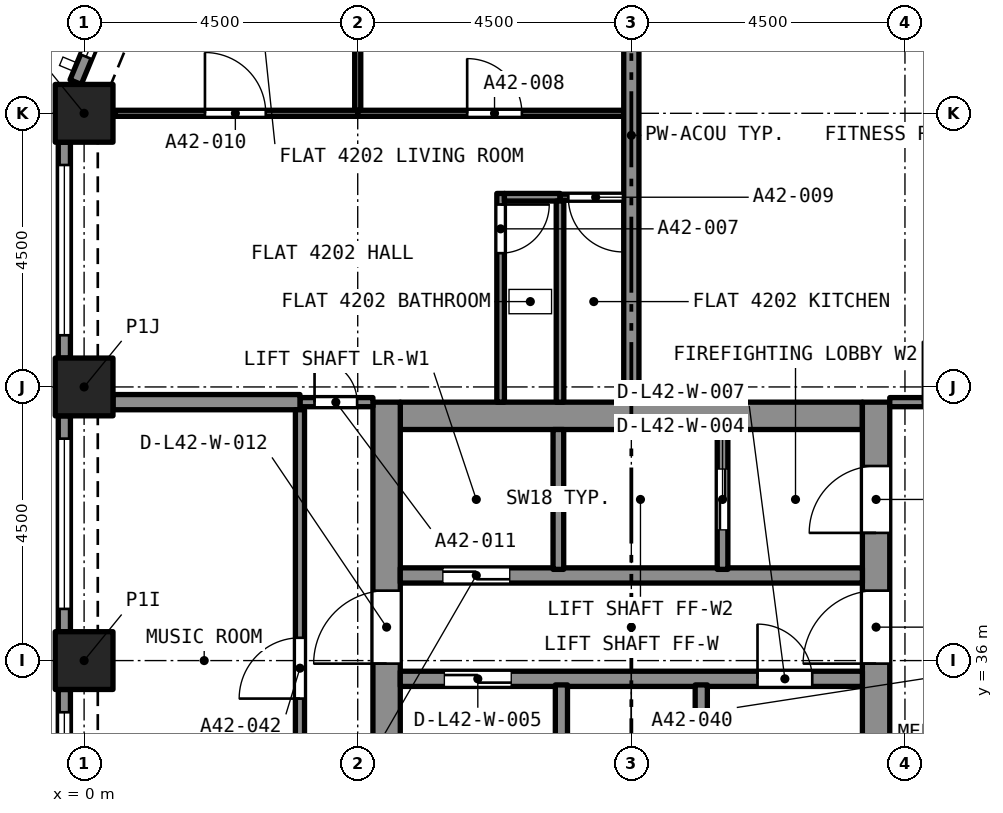
"""IFC4 building model, lengths in metres.
Left out: names, types, materials, properties, quantities, classifications, styles, units other than length and angle.
Written with IfcOpenShell. Run it as: python <this file> out.ifc"""

import sys

from ifc_helpers import new_model, si_unit, direction, frame, frame_2d, origin, origin_2d, place, context, subcontext, project, spatial, rectangle, extrude, element, fill, save


model = new_model("IFC4")
c1 = context("Model", 3, precision=1e-05, world=origin(), true_north=direction((0.0, 1.0)))
c2 = subcontext(c1, "Body", "Model", "MODEL_VIEW")
j1 = project(units=[si_unit("LENGTHUNIT", "METRE"), si_unit("PLANEANGLEUNIT", "RADIAN")], contexts=[c1])
p1 = place(None, origin())
s1 = spatial("IfcSite", under=j1, at=p1, CompositionType="ELEMENT")
p2 = place(p1, origin())
s2 = spatial("IfcBuilding", under=s1, at=p2, CompositionType="ELEMENT")
p3 = place(p2, frame((0.0, 0.0, 150.6)))
s3 = spatial("IfcBuildingStorey", under=s2, at=p3, CompositionType="ELEMENT", Elevation=150.6)
for number, where, z_axis, x_axis in (
    (1, (0.0, 36.0, 0.0), (0.0, 0.0, 1.0), (1.0, 0.0, 0.0)),
    (2, (0.0, 40.5, 0.0), (0.0, 0.0, 1.0), (1.0, 0.0, 0.0)),
    (3, (0.0, 45.0, 0.0), (0.0, 0.0, 1.0), (1.0, 0.0, 0.0)),
):
    element("IfcColumn", number, at=place(p3, frame(where, z_axis=z_axis, x_axis=x_axis)), inside=s3, PredefinedType="COLUMN", context=c2, shape_type="SweptSolid", body=[
        extrude(rectangle(XDim=0.95, YDim=0.95, at=origin_2d()), origin(), (0.0, 0.0, 1.0), 4.4),
    ])
p4 = place(p3, frame((5.2, 40.025, 0.0), z_axis=(0.0, 0.0, 1.0), x_axis=(1.0, 0.0, 0.0)))
e4 = element("IfcWall", 4, at=p4, inside=s3, PredefinedType="SOLIDWALL", context=c2, shape_type="SweptSolid", body=[
    extrude(rectangle(XDim=7.6, YDim=0.45, at=frame_2d((3.8, 0.0))), origin(), (0.0, 0.0, 1.0), 4.4),
])
p5 = place(p3, frame((4.975, 27.25, 0.0), z_axis=(0.0, 0.0, 1.0), x_axis=(0.0, 1.0, 0.0)))
e5 = element("IfcWall", 5, at=p5, inside=s3, PredefinedType="SOLIDWALL", context=c2, shape_type="SweptSolid", body=[
    extrude(rectangle(XDim=13.0, YDim=0.45, at=frame_2d((6.5, 0.0))), origin(), (0.0, 0.0, 1.0), 4.4),
])
p6 = place(p5, frame((8.7, 0.0, 0.0)))
e6 = element("IfcOpeningElement", 6, at=p6, cuts=e5, PredefinedType="OPENING", context=c2, shape_type="SweptSolid", body=[
    extrude(rectangle(XDim=1.2, YDim=2.1, at=frame_2d((0.6, 1.05))), frame((0.0, 0.235, 0.0), z_axis=(0.0, -1.0, 0.0), x_axis=(1.0, 0.0, 0.0)), (0.0, 0.0, 1.0), 0.47),
])
p7 = place(p3, frame((13.025, 27.25, 0.0), z_axis=(0.0, 0.0, 1.0), x_axis=(0.0, 1.0, 0.0)))
e7 = element("IfcWall", 7, at=p7, inside=s3, PredefinedType="SOLIDWALL", context=c2, shape_type="SweptSolid", body=[
    extrude(rectangle(XDim=13.0, YDim=0.45, at=frame_2d((6.5, 0.0))), origin(), (0.0, 0.0, 1.0), 4.4),
])
p8 = place(p7, frame((10.85, 0.0, 0.0)))
e8 = element("IfcOpeningElement", 8, at=p8, cuts=e7, PredefinedType="OPENING", context=c2, shape_type="SweptSolid", body=[
    extrude(rectangle(XDim=1.1, YDim=2.1, at=frame_2d((0.55, 1.05))), frame((0.0, 0.235, 0.0), z_axis=(0.0, -1.0, 0.0), x_axis=(1.0, 0.0, 0.0)), (0.0, 0.0, 1.0), 0.47),
])
p9 = place(p7, frame((8.7, 0.0, 0.0)))
e9 = element("IfcOpeningElement", 9, at=p9, cuts=e7, PredefinedType="OPENING", context=c2, shape_type="SweptSolid", body=[
    extrude(rectangle(XDim=1.2, YDim=2.1, at=frame_2d((0.6, 1.05))), frame((0.0, 0.235, 0.0), z_axis=(0.0, -1.0, 0.0), x_axis=(1.0, 0.0, 0.0)), (0.0, 0.0, 1.0), 0.47),
])
p10 = place(p3, frame((-0.139, 45.513, 0.0), z_axis=(0.0, 0.0, 1.0), x_axis=(0.382680855588, 0.923880599843, 0.0)))
e10 = element("IfcWall", 10, at=p10, inside=s3, PredefinedType="SOLIDWALL", context=c2, shape_type="SweptSolid", body=[
    extrude(rectangle(XDim=2.403, YDim=0.2, at=frame_2d((1.201, 0.0))), origin(), (0.0, 0.0, 1.0), 4.4),
])
p11 = place(p10, frame((0.451, 0.0, 0.45)))
e11 = element("IfcOpeningElement", 11, at=p11, cuts=e10, PredefinedType="OPENING", context=c2, shape_type="SweptSolid", body=[
    extrude(rectangle(XDim=1.7, YDim=2.55, at=frame_2d((0.85, 1.275))), frame((0.0, 0.11, 0.0), z_axis=(0.0, -1.0, 0.0), x_axis=(1.0, 0.0, 0.0)), (0.0, 0.0, 1.0), 0.22),
])
p12 = place(p3, frame((-0.325, 40.975, 0.0), z_axis=(0.0, 0.0, 1.0), x_axis=(0.0, 1.0, 0.0)))
e12 = element("IfcWall", 12, at=p12, inside=s3, PredefinedType="SOLIDWALL", context=c2, shape_type="SweptSolid", body=[
    extrude(rectangle(XDim=3.55, YDim=0.2, at=frame_2d((1.775, 0.0))), origin(), (0.0, 0.0, 1.0), 4.4),
])
p13 = place(p12, frame((0.375, 0.0, 0.45)))
e13 = element("IfcOpeningElement", 13, at=p13, cuts=e12, PredefinedType="OPENING", context=c2, shape_type="SweptSolid", body=[
    extrude(rectangle(XDim=2.8, YDim=2.55, at=frame_2d((1.4, 1.275))), frame((0.0, 0.11, 0.0), z_axis=(0.0, -1.0, 0.0), x_axis=(1.0, 0.0, 0.0)), (0.0, 0.0, 1.0), 0.22),
])
p14 = place(p3, frame((-0.325, 36.475, 0.0), z_axis=(0.0, 0.0, 1.0), x_axis=(0.0, 1.0, 0.0)))
e14 = element("IfcWall", 14, at=p14, inside=s3, PredefinedType="SOLIDWALL", context=c2, shape_type="SweptSolid", body=[
    extrude(rectangle(XDim=3.55, YDim=0.2, at=frame_2d((1.775, 0.0))), origin(), (0.0, 0.0, 1.0), 4.4),
])
p15 = place(p14, frame((0.375, 0.0, 0.45)))
e15 = element("IfcOpeningElement", 15, at=p15, cuts=e14, PredefinedType="OPENING", context=c2, shape_type="SweptSolid", body=[
    extrude(rectangle(XDim=2.8, YDim=2.55, at=frame_2d((1.4, 1.275))), frame((0.0, 0.11, 0.0), z_axis=(0.0, -1.0, 0.0), x_axis=(1.0, 0.0, 0.0)), (0.0, 0.0, 1.0), 0.22),
])
p16 = place(p3, frame((-0.325, 31.975, 0.0), z_axis=(0.0, 0.0, 1.0), x_axis=(0.0, 1.0, 0.0)))
e16 = element("IfcWall", 16, at=p16, inside=s3, PredefinedType="SOLIDWALL", context=c2, shape_type="SweptSolid", body=[
    extrude(rectangle(XDim=3.55, YDim=0.2, at=frame_2d((1.775, 0.0))), origin(), (0.0, 0.0, 1.0), 4.4),
])
p17 = place(p16, frame((0.375, 0.0, 0.45)))
e17 = element("IfcOpeningElement", 17, at=p17, cuts=e16, PredefinedType="OPENING", context=c2, shape_type="SweptSolid", body=[
    extrude(rectangle(XDim=2.8, YDim=2.55, at=frame_2d((1.4, 1.275))), frame((0.0, 0.11, 0.0), z_axis=(0.0, -1.0, 0.0), x_axis=(1.0, 0.0, 0.0)), (0.0, 0.0, 1.0), 0.22),
])
p18 = place(p3, frame((6.85, 43.683, 0.0), z_axis=(0.0, 0.0, 1.0), x_axis=(0.0, -1.0, 0.0)))
e18 = element("IfcWall", 18, at=p18, inside=s3, PredefinedType="PARTITIONING", context=c2, shape_type="SweptSolid", body=[
    extrude(rectangle(XDim=3.433, YDim=0.125, at=frame_2d((1.716, 0.0))), origin(), (0.0, 0.0, 1.0), 4.1),
])
p19 = place(p18, frame((0.183, 0.0, 0.0)))
e19 = element("IfcOpeningElement", 19, at=p19, cuts=e18, PredefinedType="OPENING", context=c2, shape_type="SweptSolid", body=[
    extrude(rectangle(XDim=0.8, YDim=2.1, at=frame_2d((0.4, 1.05))), frame((0.0, 0.073, 0.0), z_axis=(0.0, -1.0, 0.0), x_axis=(1.0, 0.0, 0.0)), (0.0, 0.0, 1.0), 0.145),
])
p20 = place(p3, frame((6.913, 43.62, 0.0), z_axis=(0.0, 0.0, 1.0), x_axis=(1.0, 0.0, 0.0)))
e20 = element("IfcWall", 20, at=p20, inside=s3, PredefinedType="PARTITIONING", context=c2, shape_type="SweptSolid", body=[
    extrude(rectangle(XDim=0.915, YDim=0.125, at=frame_2d((0.458, 0.0))), origin(), (0.0, 0.0, 1.0), 4.1),
])
p21 = place(p3, frame((7.827, 40.25, 0.0), z_axis=(0.0, 0.0, 1.0), x_axis=(0.0, 1.0, 0.0)))
e21 = element("IfcWall", 21, at=p21, inside=s3, PredefinedType="PARTITIONING", context=c2, shape_type="SweptSolid", body=[
    extrude(rectangle(XDim=3.308, YDim=0.125, at=frame_2d((1.654, 0.0))), origin(), (0.0, 0.0, 1.0), 4.1),
])
p22 = place(p3, frame((4.5, 45.0, 0.0), z_axis=(0.0, 0.0, 1.0), x_axis=(1.0, 0.0, 0.0)))
e22 = element("IfcWall", 22, at=p22, inside=s3, PredefinedType="PARTITIONING", context=c2, shape_type="SweptSolid", body=[
    extrude(rectangle(XDim=4.375, YDim=0.1, at=frame_2d((2.188, 0.0))), origin(), (0.0, 0.0, 1.0), 4.1),
])
p23 = place(p22, frame((1.8, 0.0, 0.0)))
e23 = element("IfcOpeningElement", 23, at=p23, cuts=e22, PredefinedType="OPENING", context=c2, shape_type="SweptSolid", body=[
    extrude(rectangle(XDim=0.9, YDim=2.1, at=frame_2d((0.45, 1.05))), frame((0.0, 0.06, 0.0), z_axis=(0.0, -1.0, 0.0), x_axis=(1.0, 0.0, 0.0)), (0.0, 0.0, 1.0), 0.12),
])
p24 = place(p3, frame((4.5, 45.05, 0.0), z_axis=(0.0, 0.0, 1.0), x_axis=(0.0, 1.0, 0.0)))
e24 = element("IfcWall", 24, at=p24, inside=s3, PredefinedType="PARTITIONING", context=c2, shape_type="SweptSolid", body=[
    extrude(rectangle(XDim=3.936, YDim=0.1, at=frame_2d((1.968, 0.0))), origin(), (0.0, 0.0, 1.0), 4.1),
])
p25 = place(p3, frame((8.875, 43.62, 0.0), z_axis=(0.0, 0.0, 1.0), x_axis=(-1.0, 0.0, 0.0)))
e25 = element("IfcWall", 25, at=p25, inside=s3, PredefinedType="PARTITIONING", context=c2, shape_type="SweptSolid", body=[
    extrude(rectangle(XDim=1.048, YDim=0.1, at=frame_2d((0.524, 0.0))), origin(), (0.0, 0.0, 1.0), 4.1),
])
p26 = place(p25, frame((0.011, 0.0, 0.0)))
e26 = element("IfcOpeningElement", 26, at=p26, cuts=e25, PredefinedType="OPENING", context=c2, shape_type="SweptSolid", body=[
    extrude(rectangle(XDim=0.9, YDim=2.1, at=frame_2d((0.45, 1.05))), frame((0.0, 0.06, 0.0), z_axis=(0.0, -1.0, 0.0), x_axis=(1.0, 0.0, 0.0)), (0.0, 0.0, 1.0), 0.12),
])
p27 = place(p3, frame((0.514, 45.0, 0.0), z_axis=(0.0, 0.0, 1.0), x_axis=(1.0, 0.0, 0.0)))
e27 = element("IfcWall", 27, at=p27, inside=s3, PredefinedType="PARTITIONING", context=c2, shape_type="SweptSolid", body=[
    extrude(rectangle(XDim=3.986, YDim=0.1, at=frame_2d((1.993, 0.0))), origin(), (0.0, 0.0, 1.0), 4.1),
])
p28 = place(p27, frame((1.473, 0.0, 0.0)))
e28 = element("IfcOpeningElement", 28, at=p28, cuts=e27, PredefinedType="OPENING", context=c2, shape_type="SweptSolid", body=[
    extrude(rectangle(XDim=1.0, YDim=2.1, at=frame_2d((0.5, 1.05))), frame((0.0, 0.06, 0.0), z_axis=(0.0, -1.0, 0.0), x_axis=(1.0, 0.0, 0.0)), (0.0, 0.0, 1.0), 0.12),
])
p29 = place(p3, frame((3.55, 40.25, 0.0), z_axis=(0.0, 0.0, 1.0), x_axis=(1.0, 0.0, 0.0)))
e29 = element("IfcWall", 29, at=p29, inside=s3, PredefinedType="PARTITIONING", context=c2, shape_type="SweptSolid", body=[
    extrude(rectangle(XDim=1.2, YDim=0.15, at=frame_2d((0.6, 0.0))), origin(), (0.0, 0.0, 1.0), 4.1),
])
p30 = place(p29, frame((0.24, 0.0, 0.0)))
e30 = element("IfcOpeningElement", 30, at=p30, cuts=e29, PredefinedType="OPENING", context=c2, shape_type="SweptSolid", body=[
    extrude(rectangle(XDim=0.7, YDim=2.1, at=frame_2d((0.35, 1.05))), frame((0.0, 0.085, 0.0), z_axis=(0.0, -1.0, 0.0), x_axis=(1.0, 0.0, 0.0)), (0.0, 0.0, 1.0), 0.17),
])
p31 = place(p3, frame((0.475, 40.25, 0.0), z_axis=(0.0, 0.0, 1.0), x_axis=(1.0, 0.0, 0.0)))
e31 = element("IfcWall", 31, at=p31, inside=s3, PredefinedType="PARTITIONING", context=c2, shape_type="SweptSolid", body=[
    extrude(rectangle(XDim=3.075, YDim=0.25, at=frame_2d((1.538, 0.0))), origin(), (0.0, 0.0, 1.0), 4.1),
])
p32 = place(p3, frame((9.0, 40.25, 0.0), z_axis=(0.0, 0.0, 1.0), x_axis=(0.0, 1.0, 0.0)))
e32 = element("IfcWall", 32, at=p32, inside=s3, PredefinedType="PARTITIONING", context=c2, shape_type="SweptSolid", body=[
    extrude(rectangle(XDim=8.775, YDim=0.25, at=frame_2d((4.387, 0.0))), origin(), (0.0, 0.0, 1.0), 4.1),
])
p33 = place(p3, frame((13.25, 40.25, 0.0), z_axis=(0.0, 0.0, 1.0), x_axis=(1.0, 0.0, 0.0)))
e33 = element("IfcWall", 33, at=p33, inside=s3, PredefinedType="PARTITIONING", context=c2, shape_type="SweptSolid", body=[
    extrude(rectangle(XDim=1.675, YDim=0.15, at=frame_2d((0.837, 0.0))), origin(), (0.0, 0.0, 1.0), 4.1),
])
p34 = place(p33, frame((0.545, 0.0, 0.0)))
e34 = element("IfcOpeningElement", 34, at=p34, cuts=e33, PredefinedType="OPENING", context=c2, shape_type="SweptSolid", body=[
    extrude(rectangle(XDim=1.0, YDim=2.1, at=frame_2d((0.5, 1.05))), frame((0.0, 0.085, 0.0), z_axis=(0.0, -1.0, 0.0), x_axis=(1.0, 0.0, 0.0)), (0.0, 0.0, 1.0), 0.17),
])
p35 = place(p3, frame((3.55, 31.5, 0.0), z_axis=(0.0, 0.0, 1.0), x_axis=(0.0, 1.0, 0.0)))
e35 = element("IfcWall", 35, at=p35, inside=s3, PredefinedType="PARTITIONING", context=c2, shape_type="SweptSolid", body=[
    extrude(rectangle(XDim=8.625, YDim=0.15, at=frame_2d((4.312, 0.0))), origin(), (0.0, 0.0, 1.0), 4.1),
])
p36 = place(p35, frame((3.875, 0.0, 0.0)))
e36 = element("IfcOpeningElement", 36, at=p36, cuts=e35, PredefinedType="OPENING", context=c2, shape_type="SweptSolid", body=[
    extrude(rectangle(XDim=1.0, YDim=2.1, at=frame_2d((0.5, 1.05))), frame((0.0, 0.085, 0.0), z_axis=(0.0, -1.0, 0.0), x_axis=(1.0, 0.0, 0.0)), (0.0, 0.0, 1.0), 0.17),
])
p37 = place(p3, frame((5.2, 35.7, 0.0), z_axis=(0.0, 0.0, 1.0), x_axis=(1.0, 0.0, 0.0)))
e37 = element("IfcWall", 37, at=p37, inside=s3, PredefinedType="SOLIDWALL", context=c2, shape_type="SweptSolid", body=[
    extrude(rectangle(XDim=7.6, YDim=0.25, at=frame_2d((3.8, 0.0))), origin(), (0.0, 0.0, 1.0), 4.1),
])
p38 = place(p37, frame((0.725, 0.0, 0.0)))
e38 = element("IfcOpeningElement", 38, at=p38, cuts=e37, PredefinedType="OPENING", context=c2, shape_type="SweptSolid", body=[
    extrude(rectangle(XDim=1.1, YDim=2.4, at=frame_2d((0.55, 1.2))), frame((0.0, 0.135, 0.0), z_axis=(0.0, -1.0, 0.0), x_axis=(1.0, 0.0, 0.0)), (0.0, 0.0, 1.0), 0.27),
])
p39 = place(p37, frame((5.875, 0.0, 0.0)))
e39 = element("IfcOpeningElement", 39, at=p39, cuts=e37, PredefinedType="OPENING", context=c2, shape_type="SweptSolid", body=[
    extrude(rectangle(XDim=0.9, YDim=2.1, at=frame_2d((0.45, 1.05))), frame((0.0, 0.135, 0.0), z_axis=(0.0, -1.0, 0.0), x_axis=(1.0, 0.0, 0.0)), (0.0, 0.0, 1.0), 0.27),
])
p40 = place(p3, frame((5.2, 37.4, 0.0), z_axis=(0.0, 0.0, 1.0), x_axis=(1.0, 0.0, 0.0)))
e40 = element("IfcWall", 40, at=p40, inside=s3, PredefinedType="SOLIDWALL", context=c2, shape_type="SweptSolid", body=[
    extrude(rectangle(XDim=7.6, YDim=0.25, at=frame_2d((3.8, 0.0))), origin(), (0.0, 0.0, 1.0), 4.1),
])
p41 = place(p40, frame((0.7, 0.0, 0.0)))
e41 = element("IfcOpeningElement", 41, at=p41, cuts=e40, PredefinedType="OPENING", context=c2, shape_type="SweptSolid", body=[
    extrude(rectangle(XDim=1.1, YDim=2.4, at=frame_2d((0.55, 1.2))), frame((0.0, 0.135, 0.0), z_axis=(0.0, -1.0, 0.0), x_axis=(1.0, 0.0, 0.0)), (0.0, 0.0, 1.0), 0.27),
])
for number, where, z_axis, x_axis in (
    (42, (7.85, 33.3, 0.0), (0.0, 0.0, 1.0), (0.0, 1.0, 0.0)),
    (43, (10.15, 33.3, 0.0), (0.0, 0.0, 1.0), (0.0, 1.0, 0.0)),
):
    element("IfcWall", number, at=place(p3, frame(where, z_axis=z_axis, x_axis=x_axis)), inside=s3, PredefinedType="SOLIDWALL", context=c2, shape_type="SweptSolid", body=[
        extrude(rectangle(XDim=2.3, YDim=0.2, at=frame_2d((1.15, 0.0))), origin(), (0.0, 0.0, 1.0), 4.1),
    ])
p42 = place(p3, frame((7.8, 37.5, 0.0), z_axis=(0.0, 0.0, 1.0), x_axis=(0.0, 1.0, 0.0)))
e44 = element("IfcWall", 44, at=p42, inside=s3, PredefinedType="SOLIDWALL", context=c2, shape_type="SweptSolid", body=[
    extrude(rectangle(XDim=2.3, YDim=0.175, at=frame_2d((1.15, 0.0))), origin(), (0.0, 0.0, 1.0), 4.1),
])
p43 = place(p3, frame((10.5, 37.5, 0.0), z_axis=(0.0, 0.0, 1.0), x_axis=(0.0, 1.0, 0.0)))
e45 = element("IfcWall", 45, at=p43, inside=s3, PredefinedType="SOLIDWALL", context=c2, shape_type="SweptSolid", body=[
    extrude(rectangle(XDim=2.3, YDim=0.175, at=frame_2d((1.15, 0.0))), origin(), (0.0, 0.0, 1.0), 4.1),
])
p44 = place(p43, frame((0.65, 0.0, 0.0)))
e46 = element("IfcOpeningElement", 46, at=p44, cuts=e45, PredefinedType="OPENING", context=c2, shape_type="SweptSolid", body=[
    extrude(rectangle(XDim=1.0, YDim=2.1, at=frame_2d((0.5, 1.05))), frame((0.0, 0.097, 0.0), z_axis=(0.0, -1.0, 0.0), x_axis=(1.0, 0.0, 0.0)), (0.0, 0.0, 1.0), 0.195),
])
p45 = place(p11, origin())
e47 = element("IfcWindow", 47, at=p45, inside=s3, PartitioningType="SINGLE_PANEL", PredefinedType="WINDOW", context=c2, shape_type="SweptSolid", body=[
    extrude(rectangle(XDim=1.7, YDim=2.55, at=frame_2d((0.85, 1.275))), frame((0.0, 0.03, 0.0), z_axis=(0.0, -1.0, 0.0), x_axis=(1.0, 0.0, 0.0)), (0.0, 0.0, 1.0), 0.06),
])
fill(e11, e47)
p46 = place(p13, origin())
e48 = element("IfcWindow", 48, at=p46, inside=s3, PartitioningType="SINGLE_PANEL", PredefinedType="WINDOW", context=c2, shape_type="SweptSolid", body=[
    extrude(rectangle(XDim=2.8, YDim=2.55, at=frame_2d((1.4, 1.275))), frame((0.0, 0.03, 0.0), z_axis=(0.0, -1.0, 0.0), x_axis=(1.0, 0.0, 0.0)), (0.0, 0.0, 1.0), 0.06),
])
fill(e13, e48)
p47 = place(p15, origin())
e49 = element("IfcWindow", 49, at=p47, inside=s3, PartitioningType="SINGLE_PANEL", PredefinedType="WINDOW", context=c2, shape_type="SweptSolid", body=[
    extrude(rectangle(XDim=2.8, YDim=2.55, at=frame_2d((1.4, 1.275))), frame((0.0, 0.03, 0.0), z_axis=(0.0, -1.0, 0.0), x_axis=(1.0, 0.0, 0.0)), (0.0, 0.0, 1.0), 0.06),
])
fill(e15, e49)
p48 = place(p17, origin())
e50 = element("IfcWindow", 50, at=p48, inside=s3, PartitioningType="SINGLE_PANEL", PredefinedType="WINDOW", context=c2, shape_type="SweptSolid", body=[
    extrude(rectangle(XDim=2.8, YDim=2.55, at=frame_2d((1.4, 1.275))), frame((0.0, 0.03, 0.0), z_axis=(0.0, -1.0, 0.0), x_axis=(1.0, 0.0, 0.0)), (0.0, 0.0, 1.0), 0.06),
])
fill(e17, e50)
p49 = place(p19, origin())
e51 = element("IfcDoor", 51, at=p49, inside=s3, OperationType="SINGLE_SWING_LEFT", PredefinedType="DOOR", context=c2, shape_type="SweptSolid", body=[
    extrude(rectangle(XDim=0.8, YDim=2.1, at=frame_2d((0.4, 1.05))), frame((0.0, 0.025, 0.0), z_axis=(0.0, -1.0, 0.0), x_axis=(1.0, 0.0, 0.0)), (0.0, 0.0, 1.0), 0.05),
])
fill(e19, e51)
p50 = place(p23, origin())
e52 = element("IfcDoor", 52, at=p50, inside=s3, OperationType="SINGLE_SWING_RIGHT", PredefinedType="DOOR", context=c2, shape_type="SweptSolid", body=[
    extrude(rectangle(XDim=0.9, YDim=2.1, at=frame_2d((0.45, 1.05))), frame((0.0, 0.025, 0.0), z_axis=(0.0, -1.0, 0.0), x_axis=(1.0, 0.0, 0.0)), (0.0, 0.0, 1.0), 0.05),
])
fill(e23, e52)
p51 = place(p26, origin())
e53 = element("IfcDoor", 53, at=p51, inside=s3, OperationType="SINGLE_SWING_LEFT", PredefinedType="DOOR", context=c2, shape_type="SweptSolid", body=[
    extrude(rectangle(XDim=0.9, YDim=2.1, at=frame_2d((0.45, 1.05))), frame((0.0, 0.025, 0.0), z_axis=(0.0, -1.0, 0.0), x_axis=(1.0, 0.0, 0.0)), (0.0, 0.0, 1.0), 0.05),
])
fill(e26, e53)
p52 = place(p28, origin())
e54 = element("IfcDoor", 54, at=p52, inside=s3, OperationType="SINGLE_SWING_LEFT", PredefinedType="DOOR", context=c2, shape_type="SweptSolid", body=[
    extrude(rectangle(XDim=1.0, YDim=2.1, at=frame_2d((0.5, 1.05))), frame((0.0, 0.025, 0.0), z_axis=(0.0, -1.0, 0.0), x_axis=(1.0, 0.0, 0.0)), (0.0, 0.0, 1.0), 0.05),
])
fill(e28, e54)
p53 = place(p30, origin())
e55 = element("IfcDoor", 55, at=p53, inside=s3, OperationType="SINGLE_SWING_LEFT", PredefinedType="DOOR", context=c2, shape_type="SweptSolid", body=[
    extrude(rectangle(XDim=0.7, YDim=2.1, at=frame_2d((0.35, 1.05))), frame((0.0, 0.025, 0.0), z_axis=(0.0, -1.0, 0.0), x_axis=(1.0, 0.0, 0.0)), (0.0, 0.0, 1.0), 0.05),
])
fill(e30, e55)
p54 = place(p34, origin())
e56 = element("IfcDoor", 56, at=p54, inside=s3, OperationType="SINGLE_SWING_RIGHT", PredefinedType="DOOR", context=c2, shape_type="SweptSolid", body=[
    extrude(rectangle(XDim=1.0, YDim=2.1, at=frame_2d((0.5, 1.05))), frame((0.0, 0.025, 0.0), z_axis=(0.0, -1.0, 0.0), x_axis=(1.0, 0.0, 0.0)), (0.0, 0.0, 1.0), 0.05),
])
fill(e34, e56)
p55 = place(p36, origin())
e57 = element("IfcDoor", 57, at=p55, inside=s3, OperationType="SINGLE_SWING_RIGHT", PredefinedType="DOOR", context=c2, shape_type="SweptSolid", body=[
    extrude(rectangle(XDim=1.0, YDim=2.1, at=frame_2d((0.5, 1.05))), frame((0.0, 0.025, 0.0), z_axis=(0.0, -1.0, 0.0), x_axis=(1.0, 0.0, 0.0)), (0.0, 0.0, 1.0), 0.05),
])
fill(e36, e57)
p56 = place(p41, origin())
e58 = element("IfcDoor", 58, at=p56, inside=s3, OperationType="SLIDING_TO_LEFT", PredefinedType="DOOR", context=c2, shape_type="SweptSolid", body=[
    extrude(rectangle(XDim=1.1, YDim=2.4, at=frame_2d((0.55, 1.2))), frame((0.0, 0.025, 0.0), z_axis=(0.0, -1.0, 0.0), x_axis=(1.0, 0.0, 0.0)), (0.0, 0.0, 1.0), 0.05),
])
fill(e41, e58)
p57 = place(p44, origin())
e59 = element("IfcDoor", 59, at=p57, inside=s3, OperationType="SLIDING_TO_LEFT", PredefinedType="DOOR", context=c2, shape_type="SweptSolid", body=[
    extrude(rectangle(XDim=1.0, YDim=2.1, at=frame_2d((0.5, 1.05))), frame((0.0, 0.025, 0.0), z_axis=(0.0, -1.0, 0.0), x_axis=(1.0, 0.0, 0.0)), (0.0, 0.0, 1.0), 0.05),
])
fill(e46, e59)
p58 = place(p38, origin())
e60 = element("IfcDoor", 60, at=p58, inside=s3, OperationType="SLIDING_TO_LEFT", PredefinedType="DOOR", context=c2, shape_type="SweptSolid", body=[
    extrude(rectangle(XDim=1.1, YDim=2.4, at=frame_2d((0.55, 1.2))), frame((0.0, 0.025, 0.0), z_axis=(0.0, -1.0, 0.0), x_axis=(1.0, 0.0, 0.0)), (0.0, 0.0, 1.0), 0.05),
])
fill(e38, e60)
p59 = place(p39, origin())
e61 = element("IfcDoor", 61, at=p59, inside=s3, OperationType="SINGLE_SWING_LEFT", PredefinedType="DOOR", context=c2, shape_type="SweptSolid", body=[
    extrude(rectangle(XDim=0.9, YDim=2.1, at=frame_2d((0.45, 1.05))), frame((0.0, 0.025, 0.0), z_axis=(0.0, -1.0, 0.0), x_axis=(1.0, 0.0, 0.0)), (0.0, 0.0, 1.0), 0.05),
])
fill(e39, e61)
p60 = place(p8, origin())
e62 = element("IfcDoor", 62, at=p60, inside=s3, OperationType="SINGLE_SWING_LEFT", PredefinedType="DOOR", context=c2, shape_type="SweptSolid", body=[
    extrude(rectangle(XDim=1.1, YDim=2.1, at=frame_2d((0.55, 1.05))), frame((0.0, 0.025, 0.0), z_axis=(0.0, -1.0, 0.0), x_axis=(1.0, 0.0, 0.0)), (0.0, 0.0, 1.0), 0.05),
])
fill(e8, e62)
p61 = place(p6, origin())
e63 = element("IfcDoor", 63, at=p61, inside=s3, OperationType="SINGLE_SWING_LEFT", PredefinedType="DOOR", context=c2, shape_type="SweptSolid", body=[
    extrude(rectangle(XDim=1.2, YDim=2.1, at=frame_2d((0.6, 1.05))), frame((0.0, 0.025, 0.0), z_axis=(0.0, -1.0, 0.0), x_axis=(1.0, 0.0, 0.0)), (0.0, 0.0, 1.0), 0.05),
])
fill(e6, e63)
p62 = place(p9, origin())
e64 = element("IfcDoor", 64, at=p62, inside=s3, OperationType="SINGLE_SWING_LEFT", PredefinedType="DOOR", context=c2, shape_type="SweptSolid", body=[
    extrude(rectangle(XDim=1.2, YDim=2.1, at=frame_2d((0.6, 1.05))), frame((0.0, 0.025, 0.0), z_axis=(0.0, -1.0, 0.0), x_axis=(1.0, 0.0, 0.0)), (0.0, 0.0, 1.0), 0.05),
])
fill(e9, e64)
save(model, sys.argv[1])
